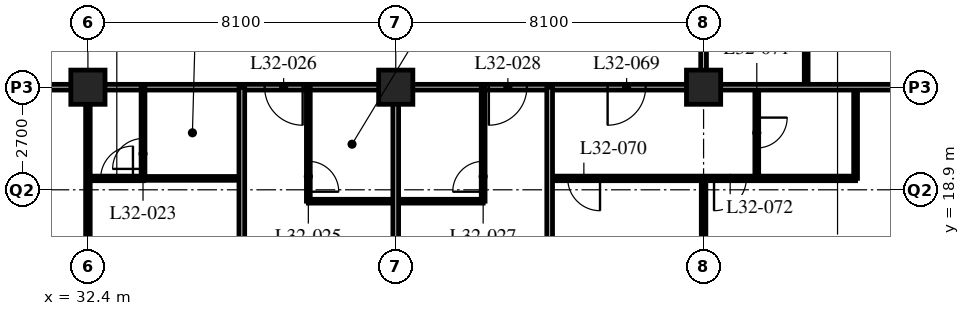
"""IFC4 building model, lengths in metres.
Left out: names, types, materials, properties, quantities, classifications, styles, units other than length and angle.
Written with IfcOpenShell. Run it as: python <this file> out.ifc"""

import sys

from ifc_helpers import new_model, si_unit, direction, frame, frame_2d, origin, origin_2d, place, context, subcontext, project, spatial, rectangle, hollow_rectangle, extrude, element, fill, save


model = new_model("IFC4")
c1 = context("Model", 3, precision=1e-05, world=origin(), true_north=direction((0.0, 1.0)))
c2 = subcontext(c1, "Body", "Model", "MODEL_VIEW")
j1 = project(units=[si_unit("LENGTHUNIT", "METRE"), si_unit("PLANEANGLEUNIT", "RADIAN")], contexts=[c1])
p1 = place(None, origin())
s1 = spatial("IfcSite", under=j1, at=p1, CompositionType="ELEMENT")
p2 = place(p1, origin())
s2 = spatial("IfcBuilding", under=s1, at=p2, CompositionType="ELEMENT")
p3 = place(p2, frame((0.0, 0.0, 127.2)))
s3 = spatial("IfcBuildingStorey", under=s2, at=p3, CompositionType="ELEMENT", Elevation=127.2)
for number, where, z_axis, x_axis in (
    (1, (32.4, 21.6, 0.0), (0.0, 0.0, 1.0), (1.0, 0.0, 0.0)),
    (2, (40.5, 21.6, 0.0), (0.0, 0.0, 1.0), (1.0, 0.0, 0.0)),
    (3, (48.6, 21.6, 0.0), (0.0, 0.0, 1.0), (1.0, 0.0, 0.0)),
):
    element("IfcColumn", number, at=place(p3, frame(where, z_axis=z_axis, x_axis=x_axis)), inside=s3, PredefinedType="COLUMN", context=c2, shape_type="SweptSolid", body=[
        extrude(hollow_rectangle(XDim=0.9, YDim=0.9, WallThickness=0.09, at=origin_2d()), origin(), (0.0, 0.0, 1.0), 3.4),
    ])
p4 = place(p3, frame((8.1, 21.6, 0.0), z_axis=(0.0, 0.0, 1.0), x_axis=(1.0, 0.0, 0.0)))
e4 = element("IfcWall", 4, at=p4, inside=s3, PredefinedType="PARTITIONING", context=c2, shape_type="SweptSolid", body=[
    extrude(rectangle(XDim=40.5, YDim=0.15, at=frame_2d((20.25, 0.0))), origin(), (0.0, 0.0, 1.0), 2.578),
])
p5 = place(p4, frame((9.625, 0.0, 0.0)))
e5 = element("IfcOpeningElement", 5, at=p5, cuts=e4, PredefinedType="OPENING", context=c2, shape_type="SweptSolid", body=[
    extrude(rectangle(XDim=1.0, YDim=2.1, at=frame_2d((0.5, 1.05))), frame((0.0, 0.085, 0.0), z_axis=(0.0, -1.0, 0.0), x_axis=(1.0, 0.0, 0.0)), (0.0, 0.0, 1.0), 0.17),
])
p6 = place(p4, frame((21.775, 0.0, 0.0)))
e6 = element("IfcOpeningElement", 6, at=p6, cuts=e4, PredefinedType="OPENING", context=c2, shape_type="SweptSolid", body=[
    extrude(rectangle(XDim=1.0, YDim=2.1, at=frame_2d((0.5, 1.05))), frame((0.0, 0.085, 0.0), z_axis=(0.0, -1.0, 0.0), x_axis=(1.0, 0.0, 0.0)), (0.0, 0.0, 1.0), 0.17),
])
p7 = place(p4, frame((28.95, 0.0, 0.0)))
e7 = element("IfcOpeningElement", 7, at=p7, cuts=e4, PredefinedType="OPENING", context=c2, shape_type="SweptSolid", body=[
    extrude(rectangle(XDim=1.0, YDim=2.1, at=frame_2d((0.5, 1.05))), frame((0.0, 0.085, 0.0), z_axis=(0.0, -1.0, 0.0), x_axis=(1.0, 0.0, 0.0)), (0.0, 0.0, 1.0), 0.17),
])
p8 = place(p4, frame((34.85, 0.0, 0.0)))
e8 = element("IfcOpeningElement", 8, at=p8, cuts=e4, PredefinedType="OPENING", context=c2, shape_type="SweptSolid", body=[
    extrude(rectangle(XDim=1.0, YDim=2.1, at=frame_2d((0.5, 1.05))), frame((0.0, 0.085, 0.0), z_axis=(0.0, -1.0, 0.0), x_axis=(1.0, 0.0, 0.0)), (0.0, 0.0, 1.0), 0.17),
])
p9 = place(p4, frame((1.525, 0.0, 0.0)))
e9 = element("IfcOpeningElement", 9, at=p9, cuts=e4, PredefinedType="OPENING", context=c2, shape_type="SweptSolid", body=[
    extrude(rectangle(XDim=1.0, YDim=2.1, at=frame_2d((0.5, 1.05))), frame((0.0, 0.085, 0.0), z_axis=(0.0, -1.0, 0.0), x_axis=(1.0, 0.0, 0.0)), (0.0, 0.0, 1.0), 0.17),
])
p10 = place(p4, frame((37.975, 0.0, 0.0)))
e10 = element("IfcOpeningElement", 10, at=p10, cuts=e4, PredefinedType="OPENING", context=c2, shape_type="SweptSolid", body=[
    extrude(rectangle(XDim=1.0, YDim=2.1, at=frame_2d((0.5, 1.05))), frame((0.0, 0.085, 0.0), z_axis=(0.0, -1.0, 0.0), x_axis=(1.0, 0.0, 0.0)), (0.0, 0.0, 1.0), 0.17),
])
p11 = place(p3, frame((48.6, 21.6, 0.0), z_axis=(0.0, 0.0, 1.0), x_axis=(0.0, 1.0, 0.0)))
e11 = element("IfcWall", 11, at=p11, inside=s3, PredefinedType="PARTITIONING", context=c2, shape_type="SweptSolid", body=[
    extrude(rectangle(XDim=24.3, YDim=0.15, at=frame_2d((12.15, 0.0))), origin(), (0.0, 0.0, 1.0), 2.578),
])
p12 = place(p11, frame((2.75, 0.0, 0.0)))
e12 = element("IfcOpeningElement", 12, at=p12, cuts=e11, PredefinedType="OPENING", context=c2, shape_type="SweptSolid", body=[
    extrude(rectangle(XDim=1.0, YDim=2.1, at=frame_2d((0.5, 1.05))), frame((0.0, 0.085, 0.0), z_axis=(0.0, -1.0, 0.0), x_axis=(1.0, 0.0, 0.0)), (0.0, 0.0, 1.0), 0.17),
])
p13 = place(p11, frame((4.65, 0.0, 0.0)))
e13 = element("IfcOpeningElement", 13, at=p13, cuts=e11, PredefinedType="OPENING", context=c2, shape_type="SweptSolid", body=[
    extrude(rectangle(XDim=1.0, YDim=2.1, at=frame_2d((0.5, 1.05))), frame((0.0, 0.085, 0.0), z_axis=(0.0, -1.0, 0.0), x_axis=(1.0, 0.0, 0.0)), (0.0, 0.0, 1.0), 0.17),
])
p14 = place(p11, frame((10.0, 0.0, 0.0)))
e14 = element("IfcOpeningElement", 14, at=p14, cuts=e11, PredefinedType="OPENING", context=c2, shape_type="SweptSolid", body=[
    extrude(rectangle(XDim=1.0, YDim=2.1, at=frame_2d((0.5, 1.05))), frame((0.0, 0.085, 0.0), z_axis=(0.0, -1.0, 0.0), x_axis=(1.0, 0.0, 0.0)), (0.0, 0.0, 1.0), 0.17),
])
p15 = place(p11, frame((18.1, 0.0, 0.0)))
e15 = element("IfcOpeningElement", 15, at=p15, cuts=e11, PredefinedType="OPENING", context=c2, shape_type="SweptSolid", body=[
    extrude(rectangle(XDim=1.0, YDim=2.1, at=frame_2d((0.5, 1.05))), frame((0.0, 0.085, 0.0), z_axis=(0.0, -1.0, 0.0), x_axis=(1.0, 0.0, 0.0)), (0.0, 0.0, 1.0), 0.17),
])
p16 = place(p3, frame((33.85, 19.2, 0.0), z_axis=(0.0, 0.0, 1.0), x_axis=(1.0, 0.0, 0.0)))
e16 = element("IfcWall", 16, at=p16, inside=s3, PredefinedType="PARTITIONING", context=c2, shape_type="SweptSolid", body=[
    extrude(rectangle(XDim=2.6, YDim=0.1, at=frame_2d((1.3, 0.0))), origin(), (0.0, 0.0, 1.0), 3.19),
])
p17 = place(p3, frame((33.85, 21.6, 0.0), z_axis=(0.0, 0.0, 1.0), x_axis=(0.0, -1.0, 0.0)))
e17 = element("IfcWall", 17, at=p17, inside=s3, PredefinedType="PARTITIONING", context=c2, shape_type="SweptSolid", body=[
    extrude(rectangle(XDim=2.4, YDim=0.1, at=frame_2d((1.2, 0.0))), origin(), (0.0, 0.0, 1.0), 3.19),
])
p18 = place(p17, frame((1.35, 0.0, 0.0)))
e18 = element("IfcOpeningElement", 18, at=p18, cuts=e17, PredefinedType="OPENING", context=c2, shape_type="SweptSolid", body=[
    extrude(rectangle(XDim=0.8, YDim=2.1, at=frame_2d((0.4, 1.05))), frame((0.0, 0.06, 0.0), z_axis=(0.0, -1.0, 0.0), x_axis=(1.0, 0.0, 0.0)), (0.0, 0.0, 1.0), 0.12),
])
p19 = place(p3, frame((32.4, 21.6, 0.0), z_axis=(0.0, 0.0, 1.0), x_axis=(0.0, -1.0, 0.0)))
e19 = element("IfcWall", 19, at=p19, inside=s3, PredefinedType="PARTITIONING", context=c2, shape_type="SweptSolid", body=[
    extrude(rectangle(XDim=15.9, YDim=0.12, at=frame_2d((7.95, 0.0))), origin(), (0.0, 0.0, 1.0), 2.578),
])
p20 = place(p19, frame((8.875, 0.0, 0.0)))
e20 = element("IfcOpeningElement", 20, at=p20, cuts=e19, PredefinedType="OPENING", context=c2, shape_type="SweptSolid", body=[
    extrude(rectangle(XDim=0.85, YDim=2.1, at=frame_2d((0.425, 1.05))), frame((0.0, 0.07, 0.0), z_axis=(0.0, -1.0, 0.0), x_axis=(1.0, 0.0, 0.0)), (0.0, 0.0, 1.0), 0.14),
])
p21 = place(p3, frame((36.45, 21.6, 0.0), z_axis=(0.0, 0.0, 1.0), x_axis=(0.0, -1.0, 0.0)))
e21 = element("IfcWall", 21, at=p21, inside=s3, PredefinedType="PARTITIONING", context=c2, shape_type="SweptSolid", body=[
    extrude(rectangle(XDim=15.9, YDim=0.15, at=frame_2d((7.95, 0.0))), origin(), (0.0, 0.0, 1.0), 3.19),
])
p22 = place(p3, frame((38.2, 18.6, 0.0), z_axis=(0.0, 0.0, 1.0), x_axis=(1.0, 0.0, 0.0)))
e22 = element("IfcWall", 22, at=p22, inside=s3, PredefinedType="PARTITIONING", context=c2, shape_type="SweptSolid", body=[
    extrude(rectangle(XDim=4.6, YDim=0.1, at=frame_2d((2.3, 0.0))), origin(), (0.0, 0.0, 1.0), 3.19),
])
p23 = place(p3, frame((38.2, 21.6, 0.0), z_axis=(0.0, 0.0, 1.0), x_axis=(0.0, -1.0, 0.0)))
e23 = element("IfcWall", 23, at=p23, inside=s3, PredefinedType="PARTITIONING", context=c2, shape_type="SweptSolid", body=[
    extrude(rectangle(XDim=3.0, YDim=0.1, at=frame_2d((1.5, 0.0))), origin(), (0.0, 0.0, 1.0), 3.19),
])
p24 = place(p23, frame((1.95, 0.0, 0.0)))
e24 = element("IfcOpeningElement", 24, at=p24, cuts=e23, PredefinedType="OPENING", context=c2, shape_type="SweptSolid", body=[
    extrude(rectangle(XDim=0.8, YDim=2.1, at=frame_2d((0.4, 1.05))), frame((0.0, 0.06, 0.0), z_axis=(0.0, -1.0, 0.0), x_axis=(1.0, 0.0, 0.0)), (0.0, 0.0, 1.0), 0.12),
])
p25 = place(p3, frame((40.5, 21.6, 0.0), z_axis=(0.0, 0.0, 1.0), x_axis=(0.0, -1.0, 0.0)))
e25 = element("IfcWall", 25, at=p25, inside=s3, PredefinedType="PARTITIONING", context=c2, shape_type="SweptSolid", body=[
    extrude(rectangle(XDim=15.9, YDim=0.15, at=frame_2d((7.95, 0.0))), origin(), (0.0, 0.0, 1.0), 2.578),
])
p26 = place(p3, frame((42.8, 21.6, 0.0), z_axis=(0.0, 0.0, 1.0), x_axis=(0.0, -1.0, 0.0)))
e26 = element("IfcWall", 26, at=p26, inside=s3, PredefinedType="PARTITIONING", context=c2, shape_type="SweptSolid", body=[
    extrude(rectangle(XDim=3.0, YDim=0.1, at=frame_2d((1.5, 0.0))), origin(), (0.0, 0.0, 1.0), 3.19),
])
p27 = place(p26, frame((1.95, 0.0, 0.0)))
e27 = element("IfcOpeningElement", 27, at=p27, cuts=e26, PredefinedType="OPENING", context=c2, shape_type="SweptSolid", body=[
    extrude(rectangle(XDim=0.8, YDim=2.1, at=frame_2d((0.4, 1.05))), frame((0.0, 0.06, 0.0), z_axis=(0.0, -1.0, 0.0), x_axis=(1.0, 0.0, 0.0)), (0.0, 0.0, 1.0), 0.12),
])
p28 = place(p3, frame((51.3, 21.6, 0.0), z_axis=(0.0, 0.0, 1.0), x_axis=(0.0, 1.0, 0.0)))
e28 = element("IfcWall", 28, at=p28, inside=s3, PredefinedType="PARTITIONING", context=c2, shape_type="SweptSolid", body=[
    extrude(rectangle(XDim=2.6, YDim=0.1, at=frame_2d((1.3, 0.0))), origin(), (0.0, 0.0, 1.0), 3.19),
])
p29 = place(p3, frame((44.55, 19.2, 0.0), z_axis=(0.0, 0.0, 1.0), x_axis=(1.0, 0.0, 0.0)))
e29 = element("IfcWall", 29, at=p29, inside=s3, PredefinedType="PARTITIONING", context=c2, shape_type="SweptSolid", body=[
    extrude(rectangle(XDim=8.05, YDim=0.12, at=frame_2d((4.025, 0.0))), origin(), (0.0, 0.0, 1.0), 3.19),
])
p30 = place(p29, frame((0.475, 0.0, 0.0)))
e30 = element("IfcOpeningElement", 30, at=p30, cuts=e29, PredefinedType="OPENING", context=c2, shape_type="SweptSolid", body=[
    extrude(rectangle(XDim=0.85, YDim=2.1, at=frame_2d((0.425, 1.05))), frame((0.0, 0.07, 0.0), z_axis=(0.0, -1.0, 0.0), x_axis=(1.0, 0.0, 0.0)), (0.0, 0.0, 1.0), 0.14),
])
p31 = place(p29, frame((4.325, 0.0, 0.0)))
e31 = element("IfcOpeningElement", 31, at=p31, cuts=e29, PredefinedType="OPENING", context=c2, shape_type="SweptSolid", body=[
    extrude(rectangle(XDim=0.85, YDim=2.1, at=frame_2d((0.425, 1.05))), frame((0.0, 0.07, 0.0), z_axis=(0.0, -1.0, 0.0), x_axis=(1.0, 0.0, 0.0)), (0.0, 0.0, 1.0), 0.14),
])
p32 = place(p3, frame((50.0, 21.6, 0.0), z_axis=(0.0, 0.0, 1.0), x_axis=(0.0, -1.0, 0.0)))
e32 = element("IfcWall", 32, at=p32, inside=s3, PredefinedType="PARTITIONING", context=c2, shape_type="SweptSolid", body=[
    extrude(rectangle(XDim=2.4, YDim=0.1, at=frame_2d((1.2, 0.0))), origin(), (0.0, 0.0, 1.0), 3.19),
])
p33 = place(p32, frame((0.8, 0.0, 0.0)))
e33 = element("IfcOpeningElement", 33, at=p33, cuts=e32, PredefinedType="OPENING", context=c2, shape_type="SweptSolid", body=[
    extrude(rectangle(XDim=0.8, YDim=2.1, at=frame_2d((0.4, 1.05))), frame((0.0, 0.06, 0.0), z_axis=(0.0, -1.0, 0.0), x_axis=(1.0, 0.0, 0.0)), (0.0, 0.0, 1.0), 0.12),
])
p34 = place(p3, frame((52.6, 21.6, 0.0), z_axis=(0.0, 0.0, 1.0), x_axis=(0.0, -1.0, 0.0)))
e34 = element("IfcWall", 34, at=p34, inside=s3, PredefinedType="PARTITIONING", context=c2, shape_type="SweptSolid", body=[
    extrude(rectangle(XDim=2.4, YDim=0.1, at=frame_2d((1.2, 0.0))), origin(), (0.0, 0.0, 1.0), 3.19),
])
p35 = place(p3, frame((48.6, 19.2, 0.0), z_axis=(0.0, 0.0, 1.0), x_axis=(0.0, -1.0, 0.0)))
e35 = element("IfcWall", 35, at=p35, inside=s3, PredefinedType="PARTITIONING", context=c2, shape_type="SweptSolid", body=[
    extrude(rectangle(XDim=9.45, YDim=0.12, at=frame_2d((4.725, 0.0))), origin(), (0.0, 0.0, 1.0), 2.578),
])
p36 = place(p3, frame((48.6, 21.6, 0.0), z_axis=(0.0, 0.0, 1.0), x_axis=(1.0, 0.0, 0.0)))
e36 = element("IfcWall", 36, at=p36, inside=s3, PredefinedType="PARTITIONING", context=c2, shape_type="SweptSolid", body=[
    extrude(rectangle(XDim=7.8, YDim=0.15, at=frame_2d((3.9, 0.0))), origin(), (0.0, 0.0, 1.0), 2.578),
])
p37 = place(p3, frame((44.55, 21.6, 0.0), z_axis=(0.0, 0.0, 1.0), x_axis=(0.0, -1.0, 0.0)))
e37 = element("IfcWall", 37, at=p37, inside=s3, PredefinedType="PARTITIONING", context=c2, shape_type="SweptSolid", body=[
    extrude(rectangle(XDim=15.9, YDim=0.15, at=frame_2d((7.95, 0.0))), origin(), (0.0, 0.0, 1.0), 3.19),
])
p38 = place(p3, frame((33.86, 19.2, 0.0), z_axis=(0.0, 0.0, 1.0), x_axis=(-1.0, 0.0, 0.0)))
e38 = element("IfcWall", 38, at=p38, inside=s3, PredefinedType="PARTITIONING", context=c2, shape_type="SweptSolid", body=[
    extrude(rectangle(XDim=1.46, YDim=0.12, at=frame_2d((0.73, 0.0))), origin(), (0.0, 0.0, 1.0), 3.19),
])
p39 = place(p38, frame((0.275, 0.0, 0.0)))
e39 = element("IfcOpeningElement", 39, at=p39, cuts=e38, PredefinedType="OPENING", context=c2, shape_type="SweptSolid", body=[
    extrude(rectangle(XDim=0.85, YDim=2.1, at=frame_2d((0.425, 1.05))), frame((0.0, 0.07, 0.0), z_axis=(0.0, -1.0, 0.0), x_axis=(1.0, 0.0, 0.0)), (0.0, 0.0, 1.0), 0.14),
])
p40 = place(p18, origin())
e40 = element("IfcDoor", 40, at=p40, inside=s3, OperationType="SINGLE_SWING_LEFT", PredefinedType="DOOR", context=c2, shape_type="SweptSolid", body=[
    extrude(rectangle(XDim=0.8, YDim=2.1, at=frame_2d((0.4, 1.05))), frame((0.0, 0.025, 0.0), z_axis=(0.0, -1.0, 0.0), x_axis=(1.0, 0.0, 0.0)), (0.0, 0.0, 1.0), 0.05),
])
fill(e18, e40)
p41 = place(p24, origin())
e41 = element("IfcDoor", 41, at=p41, inside=s3, OperationType="SINGLE_SWING_RIGHT", PredefinedType="DOOR", context=c2, shape_type="SweptSolid", body=[
    extrude(rectangle(XDim=0.8, YDim=2.1, at=frame_2d((0.4, 1.05))), frame((0.0, 0.025, 0.0), z_axis=(0.0, -1.0, 0.0), x_axis=(1.0, 0.0, 0.0)), (0.0, 0.0, 1.0), 0.05),
])
fill(e24, e41)
p42 = place(p7, origin())
e42 = element("IfcDoor", 42, at=p42, inside=s3, OperationType="SINGLE_SWING_LEFT", PredefinedType="DOOR", context=c2, shape_type="SweptSolid", body=[
    extrude(rectangle(XDim=1.0, YDim=2.1, at=frame_2d((0.5, 1.05))), frame((0.0, 0.025, 0.0), z_axis=(0.0, -1.0, 0.0), x_axis=(1.0, 0.0, 0.0)), (0.0, 0.0, 1.0), 0.05),
])
fill(e7, e42)
p43 = place(p27, origin())
e43 = element("IfcDoor", 43, at=p43, inside=s3, OperationType="SINGLE_SWING_LEFT", PredefinedType="DOOR", context=c2, shape_type="SweptSolid", body=[
    extrude(rectangle(XDim=0.8, YDim=2.1, at=frame_2d((0.4, 1.05))), frame((0.0, 0.025, 0.0), z_axis=(0.0, -1.0, 0.0), x_axis=(1.0, 0.0, 0.0)), (0.0, 0.0, 1.0), 0.05),
])
fill(e27, e43)
p44 = place(p8, origin())
e44 = element("IfcDoor", 44, at=p44, inside=s3, OperationType="SINGLE_SWING_RIGHT", PredefinedType="DOOR", context=c2, shape_type="SweptSolid", body=[
    extrude(rectangle(XDim=1.0, YDim=2.1, at=frame_2d((0.5, 1.05))), frame((0.0, 0.025, 0.0), z_axis=(0.0, -1.0, 0.0), x_axis=(1.0, 0.0, 0.0)), (0.0, 0.0, 1.0), 0.05),
])
fill(e8, e44)
p45 = place(p10, origin())
e45 = element("IfcDoor", 45, at=p45, inside=s3, OperationType="SINGLE_SWING_RIGHT", PredefinedType="DOOR", context=c2, shape_type="SweptSolid", body=[
    extrude(rectangle(XDim=1.0, YDim=2.1, at=frame_2d((0.5, 1.05))), frame((0.0, 0.025, 0.0), z_axis=(0.0, -1.0, 0.0), x_axis=(1.0, 0.0, 0.0)), (0.0, 0.0, 1.0), 0.05),
])
fill(e10, e45)
p46 = place(p30, origin())
e46 = element("IfcDoor", 46, at=p46, inside=s3, OperationType="SINGLE_SWING_LEFT", PredefinedType="DOOR", context=c2, shape_type="SweptSolid", body=[
    extrude(rectangle(XDim=0.85, YDim=2.1, at=frame_2d((0.425, 1.05))), frame((0.0, 0.025, 0.0), z_axis=(0.0, -1.0, 0.0), x_axis=(1.0, 0.0, 0.0)), (0.0, 0.0, 1.0), 0.05),
])
fill(e30, e46)
p47 = place(p33, origin())
e47 = element("IfcDoor", 47, at=p47, inside=s3, OperationType="SINGLE_SWING_LEFT", PredefinedType="DOOR", context=c2, shape_type="SweptSolid", body=[
    extrude(rectangle(XDim=0.8, YDim=2.1, at=frame_2d((0.4, 1.05))), frame((0.0, 0.025, 0.0), z_axis=(0.0, -1.0, 0.0), x_axis=(1.0, 0.0, 0.0)), (0.0, 0.0, 1.0), 0.05),
])
fill(e33, e47)
p48 = place(p31, origin())
e48 = element("IfcDoor", 48, at=p48, inside=s3, OperationType="SINGLE_SWING_RIGHT", PredefinedType="DOOR", context=c2, shape_type="SweptSolid", body=[
    extrude(rectangle(XDim=0.85, YDim=2.1, at=frame_2d((0.425, 1.05))), frame((0.0, 0.025, 0.0), z_axis=(0.0, -1.0, 0.0), x_axis=(1.0, 0.0, 0.0)), (0.0, 0.0, 1.0), 0.05),
])
fill(e31, e48)
p49 = place(p39, origin())
e49 = element("IfcDoor", 49, at=p49, inside=s3, OperationType="SINGLE_SWING_RIGHT", PredefinedType="DOOR", context=c2, shape_type="SweptSolid", body=[
    extrude(rectangle(XDim=0.85, YDim=2.1, at=frame_2d((0.425, 1.05))), frame((0.0, 0.025, 0.0), z_axis=(0.0, -1.0, 0.0), x_axis=(1.0, 0.0, 0.0)), (0.0, 0.0, 1.0), 0.05),
])
fill(e39, e49)
save(model, sys.argv[1])
